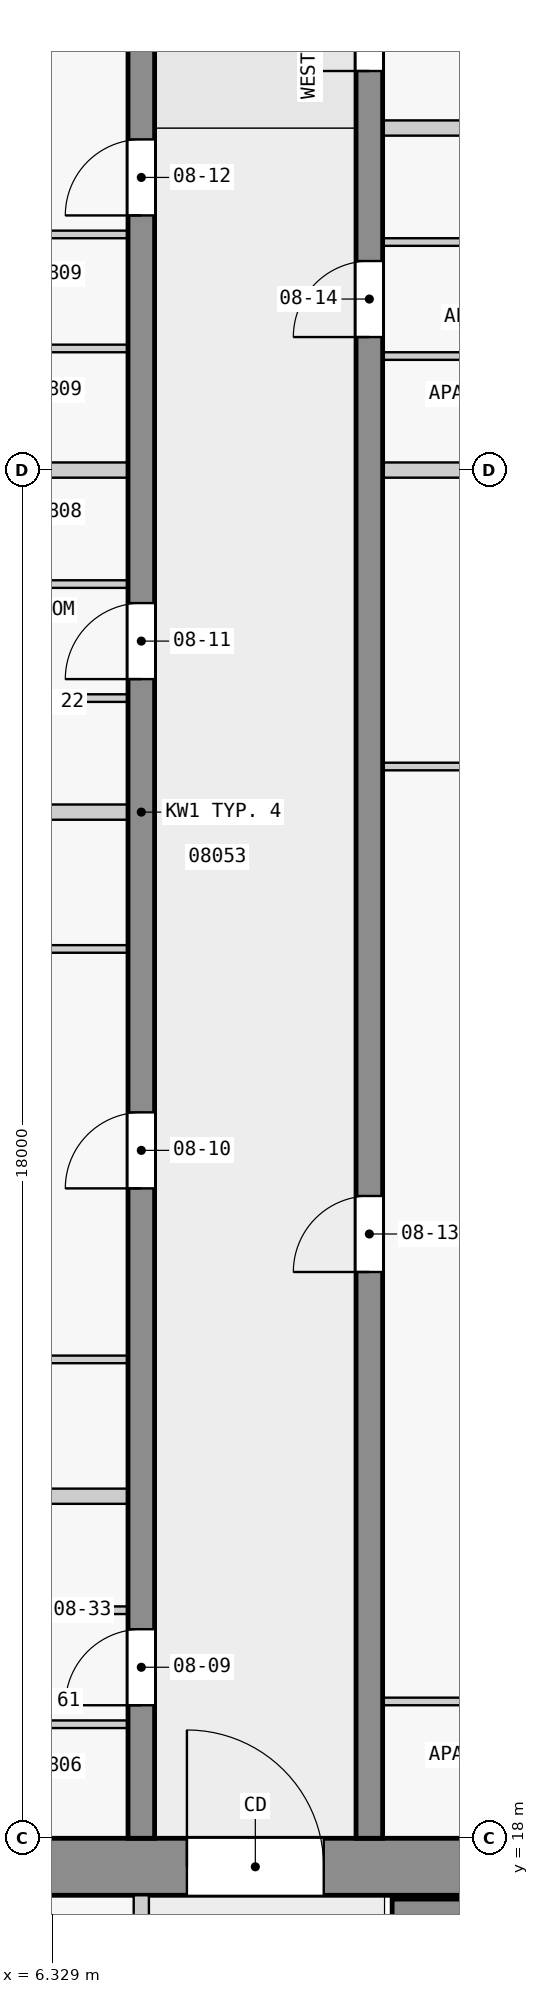
"""IFC4 building model, lengths in metres.
Left out: names, types, materials, properties, quantities, classifications, styles, units other than length and angle.
Written with IfcOpenShell. Run it as: python <this file> out.ifc"""

import sys

from ifc_helpers import new_model, si_unit, direction, frame, frame_2d, origin, place, context, subcontext, project, spatial, rectangle, extrude, element, fill, save


model = new_model("IFC4")
c1 = context("Model", 3, precision=1e-05, world=origin(), true_north=direction((0.0, 1.0)))
c2 = subcontext(c1, "Body", "Model", "MODEL_VIEW")
j1 = project(units=[si_unit("LENGTHUNIT", "METRE"), si_unit("PLANEANGLEUNIT", "RADIAN")], contexts=[c1])
p1 = place(None, origin())
s1 = spatial("IfcSite", under=j1, at=p1, CompositionType="ELEMENT")
p2 = place(p1, origin())
s2 = spatial("IfcBuilding", under=s1, at=p2, CompositionType="ELEMENT")
p3 = place(p2, frame((0.0, 0.0, 37.3)))
s3 = spatial("IfcBuildingStorey", under=s2, at=p3, CompositionType="ELEMENT", Elevation=37.3)
p4 = place(p3, frame((1.55, 17.625, 0.0), z_axis=(0.0, 0.0, 1.0), x_axis=(1.0, 0.0, 0.0)))
e1 = element("IfcWall", 1, at=p4, inside=s3, PredefinedType="SHEAR", context=c2, shape_type="SweptSolid", body=[
    extrude(rectangle(XDim=20.95, YDim=0.75, at=frame_2d((10.475, 0.0))), origin(), (0.0, 0.0, 1.0), 3.25),
])
p5 = place(p4, frame((6.55, 0.0, 0.0)))
e2 = element("IfcOpeningElement", 2, at=p5, cuts=e1, PredefinedType="OPENING", context=c2, shape_type="SweptSolid", body=[
    extrude(rectangle(XDim=1.8, YDim=2.1, at=frame_2d((0.9, 1.05))), frame((0.0, 0.385, 0.0), z_axis=(0.0, -1.0, 0.0), x_axis=(1.0, 0.0, 0.0)), (0.0, 0.0, 1.0), 0.77),
])
p6 = place(p3, frame((10.8, 17.05, 0.0), z_axis=(0.0, 0.0, 1.0), x_axis=(1.0, 0.0, 0.0)))
e3 = element("IfcWall", 3, at=p6, inside=s3, PredefinedType="SHEAR", context=c2, shape_type="SweptSolid", body=[
    extrude(rectangle(XDim=7.8, YDim=0.3, at=frame_2d((3.9, 0.0))), origin(), (0.0, 0.0, 1.0), 3.25),
])
p7 = place(p3, frame((7.5, 18.0, 0.0), z_axis=(0.0, 0.0, 1.0), x_axis=(0.0, 1.0, 0.0)))
e4 = element("IfcWall", 4, at=p7, inside=s3, PredefinedType="SHEAR", context=c2, shape_type="SweptSolid", body=[
    extrude(rectangle(XDim=27.0, YDim=0.35, at=frame_2d((13.5, 0.0))), origin(), (0.0, 0.0, 1.0), 3.25),
])
p8 = place(p7, frame((1.75, 0.0, 0.0)))
e5 = element("IfcOpeningElement", 5, at=p8, cuts=e4, PredefinedType="OPENING", context=c2, shape_type="SweptSolid", body=[
    extrude(rectangle(XDim=1.0, YDim=2.1, at=frame_2d((0.5, 1.05))), frame((0.0, 0.185, 0.0), z_axis=(0.0, -1.0, 0.0), x_axis=(1.0, 0.0, 0.0)), (0.0, 0.0, 1.0), 0.37),
])
p9 = place(p7, frame((8.55, 0.0, 0.0)))
e6 = element("IfcOpeningElement", 6, at=p9, cuts=e4, PredefinedType="OPENING", context=c2, shape_type="SweptSolid", body=[
    extrude(rectangle(XDim=1.0, YDim=2.1, at=frame_2d((0.5, 1.05))), frame((0.0, 0.185, 0.0), z_axis=(0.0, -1.0, 0.0), x_axis=(1.0, 0.0, 0.0)), (0.0, 0.0, 1.0), 0.37),
])
p10 = place(p7, frame((15.25, 0.0, 0.0)))
e7 = element("IfcOpeningElement", 7, at=p10, cuts=e4, PredefinedType="OPENING", context=c2, shape_type="SweptSolid", body=[
    extrude(rectangle(XDim=1.0, YDim=2.1, at=frame_2d((0.5, 1.05))), frame((0.0, 0.185, 0.0), z_axis=(0.0, -1.0, 0.0), x_axis=(1.0, 0.0, 0.0)), (0.0, 0.0, 1.0), 0.37),
])
p11 = place(p7, frame((21.35, 0.0, 0.0)))
e8 = element("IfcOpeningElement", 8, at=p11, cuts=e4, PredefinedType="OPENING", context=c2, shape_type="SweptSolid", body=[
    extrude(rectangle(XDim=1.0, YDim=2.1, at=frame_2d((0.5, 1.05))), frame((0.0, 0.185, 0.0), z_axis=(0.0, -1.0, 0.0), x_axis=(1.0, 0.0, 0.0)), (0.0, 0.0, 1.0), 0.37),
])
p12 = place(p3, frame((10.5, 18.0, 0.0), z_axis=(0.0, 0.0, 1.0), x_axis=(0.0, 1.0, 0.0)))
e9 = element("IfcWall", 9, at=p12, inside=s3, PredefinedType="SHEAR", context=c2, shape_type="SweptSolid", body=[
    extrude(rectangle(XDim=27.0, YDim=0.35, at=frame_2d((13.5, 0.0))), origin(), (0.0, 0.0, 1.0), 3.25),
])
p13 = place(p12, frame((7.45, 0.0, 0.0)))
e10 = element("IfcOpeningElement", 10, at=p13, cuts=e9, PredefinedType="OPENING", context=c2, shape_type="SweptSolid", body=[
    extrude(rectangle(XDim=1.0, YDim=2.1, at=frame_2d((0.5, 1.05))), frame((0.0, 0.185, 0.0), z_axis=(0.0, -1.0, 0.0), x_axis=(1.0, 0.0, 0.0)), (0.0, 0.0, 1.0), 0.37),
])
p14 = place(p12, frame((19.75, 0.0, 0.0)))
e11 = element("IfcOpeningElement", 11, at=p14, cuts=e9, PredefinedType="OPENING", context=c2, shape_type="SweptSolid", body=[
    extrude(rectangle(XDim=1.0, YDim=2.1, at=frame_2d((0.5, 1.05))), frame((0.0, 0.185, 0.0), z_axis=(0.0, -1.0, 0.0), x_axis=(1.0, 0.0, 0.0)), (0.0, 0.0, 1.0), 0.37),
])
p15 = place(p12, frame((23.25, 0.0, 0.0)))
e12 = element("IfcOpeningElement", 12, at=p15, cuts=e9, PredefinedType="OPENING", context=c2, shape_type="SweptSolid", body=[
    extrude(rectangle(XDim=0.9, YDim=2.1, at=frame_2d((0.45, 1.05))), frame((0.0, 0.185, 0.0), z_axis=(0.0, -1.0, 0.0), x_axis=(1.0, 0.0, 0.0)), (0.0, 0.0, 1.0), 0.37),
])
p16 = place(p12, frame((25.45, 0.0, 0.0)))
e13 = element("IfcOpeningElement", 13, at=p16, cuts=e9, PredefinedType="OPENING", context=c2, shape_type="SweptSolid", body=[
    extrude(rectangle(XDim=1.0, YDim=2.1, at=frame_2d((0.5, 1.05))), frame((0.0, 0.185, 0.0), z_axis=(0.0, -1.0, 0.0), x_axis=(1.0, 0.0, 0.0)), (0.0, 0.0, 1.0), 0.37),
])
p17 = place(p3, frame((7.5, 10.1, 0.0), z_axis=(0.0, 0.0, 1.0), x_axis=(0.0, 1.0, 0.0)))
e14 = element("IfcWall", 14, at=p17, inside=s3, PredefinedType="PARTITIONING", context=c2, shape_type="SweptSolid", body=[
    extrude(rectangle(XDim=7.15, YDim=0.2, at=frame_2d((3.575, 0.0))), origin(), (0.0, 0.0, 1.0), 3.25),
])
p18 = place(p17, frame((0.775, 0.0, 0.0)))
e15 = element("IfcOpeningElement", 15, at=p18, cuts=e14, PredefinedType="OPENING", context=c2, shape_type="SweptSolid", body=[
    extrude(rectangle(XDim=0.9, YDim=2.1, at=frame_2d((0.45, 1.05))), frame((0.0, 0.11, 0.0), z_axis=(0.0, -1.0, 0.0), x_axis=(1.0, 0.0, 0.0)), (0.0, 0.0, 1.0), 0.22),
])
p19 = place(p17, frame((3.225, 0.0, 0.0)))
e16 = element("IfcOpeningElement", 16, at=p19, cuts=e14, PredefinedType="OPENING", context=c2, shape_type="SweptSolid", body=[
    extrude(rectangle(XDim=0.9, YDim=2.1, at=frame_2d((0.45, 1.05))), frame((0.0, 0.11, 0.0), z_axis=(0.0, -1.0, 0.0), x_axis=(1.0, 0.0, 0.0)), (0.0, 0.0, 1.0), 0.22),
])
p20 = place(p17, frame((5.25, 0.0, 0.0)))
e17 = element("IfcOpeningElement", 17, at=p20, cuts=e14, PredefinedType="OPENING", context=c2, shape_type="SweptSolid", body=[
    extrude(rectangle(XDim=0.9, YDim=2.1, at=frame_2d((0.45, 1.05))), frame((0.0, 0.11, 0.0), z_axis=(0.0, -1.0, 0.0), x_axis=(1.0, 0.0, 0.0)), (0.0, 0.0, 1.0), 0.22),
])
p21 = place(p3, frame((7.325, 19.5, 0.0), z_axis=(0.0, 0.0, 1.0), x_axis=(-1.0, 0.0, 0.0)))
e18 = element("IfcWall", 18, at=p21, inside=s3, PredefinedType="PARTITIONING", context=c2, shape_type="SweptSolid", body=[
    extrude(rectangle(XDim=3.4, YDim=0.1, at=frame_2d((1.7, 0.0))), origin(), (0.0, 0.0, 1.0), 3.25),
])
p22 = place(p21, frame((1.25, 0.0, 0.0)))
e19 = element("IfcOpeningElement", 19, at=p22, cuts=e18, PredefinedType="OPENING", context=c2, shape_type="SweptSolid", body=[
    extrude(rectangle(XDim=0.9, YDim=2.1, at=frame_2d((0.45, 1.05))), frame((0.0, 0.06, 0.0), z_axis=(0.0, -1.0, 0.0), x_axis=(1.0, 0.0, 0.0)), (0.0, 0.0, 1.0), 0.12),
])
p23 = place(p3, frame((14.025, 19.8, 0.0), z_axis=(0.0, 0.0, 1.0), x_axis=(-1.0, 0.0, 0.0)))
e20 = element("IfcWall", 20, at=p23, inside=s3, PredefinedType="PARTITIONING", context=c2, shape_type="SweptSolid", body=[
    extrude(rectangle(XDim=3.35, YDim=0.1, at=frame_2d((1.675, 0.0))), origin(), (0.0, 0.0, 1.0), 3.25),
])
p24 = place(p23, frame((1.25, 0.0, 0.0)))
e21 = element("IfcOpeningElement", 21, at=p24, cuts=e20, PredefinedType="OPENING", context=c2, shape_type="SweptSolid", body=[
    extrude(rectangle(XDim=0.9, YDim=2.1, at=frame_2d((0.45, 1.05))), frame((0.0, 0.06, 0.0), z_axis=(0.0, -1.0, 0.0), x_axis=(1.0, 0.0, 0.0)), (0.0, 0.0, 1.0), 0.12),
])
p25 = place(p3, frame((3.925, 21.0, 0.0), z_axis=(0.0, 0.0, 1.0), x_axis=(1.0, 0.0, 0.0)))
e22 = element("IfcWall", 22, at=p25, inside=s3, PredefinedType="PARTITIONING", context=c2, shape_type="SweptSolid", body=[
    extrude(rectangle(XDim=3.4, YDim=0.1, at=frame_2d((1.7, 0.0))), origin(), (0.0, 0.0, 1.0), 3.25),
])
p26 = place(p25, frame((1.25, 0.0, 0.0)))
e23 = element("IfcOpeningElement", 23, at=p26, cuts=e22, PredefinedType="OPENING", context=c2, shape_type="SweptSolid", body=[
    extrude(rectangle(XDim=0.9, YDim=2.1, at=frame_2d((0.45, 1.05))), frame((0.0, 0.06, 0.0), z_axis=(0.0, -1.0, 0.0), x_axis=(1.0, 0.0, 0.0)), (0.0, 0.0, 1.0), 0.12),
])
p27 = place(p3, frame((7.325, 22.5, 0.0), z_axis=(0.0, 0.0, 1.0), x_axis=(-1.0, 0.0, 0.0)))
e24 = element("IfcWall", 24, at=p27, inside=s3, PredefinedType="PARTITIONING", context=c2, shape_type="SweptSolid", body=[
    extrude(rectangle(XDim=3.3, YDim=0.2, at=frame_2d((1.65, 0.0))), origin(), (0.0, 0.0, 1.0), 3.25),
])
p28 = place(p3, frame((7.325, 24.3, 0.0), z_axis=(0.0, 0.0, 1.0), x_axis=(-1.0, 0.0, 0.0)))
e25 = element("IfcWall", 25, at=p28, inside=s3, PredefinedType="PARTITIONING", context=c2, shape_type="SweptSolid", body=[
    extrude(rectangle(XDim=3.4, YDim=0.1, at=frame_2d((1.7, 0.0))), origin(), (0.0, 0.0, 1.0), 3.25),
])
p29 = place(p28, frame((1.25, 0.0, 0.0)))
e26 = element("IfcOpeningElement", 26, at=p29, cuts=e25, PredefinedType="OPENING", context=c2, shape_type="SweptSolid", body=[
    extrude(rectangle(XDim=0.9, YDim=2.1, at=frame_2d((0.45, 1.05))), frame((0.0, 0.06, 0.0), z_axis=(0.0, -1.0, 0.0), x_axis=(1.0, 0.0, 0.0)), (0.0, 0.0, 1.0), 0.12),
])
p30 = place(p3, frame((3.925, 29.7, 0.0), z_axis=(0.0, 0.0, 1.0), x_axis=(1.0, 0.0, 0.0)))
e27 = element("IfcWall", 27, at=p30, inside=s3, PredefinedType="PARTITIONING", context=c2, shape_type="SweptSolid", body=[
    extrude(rectangle(XDim=3.4, YDim=0.1, at=frame_2d((1.7, 0.0))), origin(), (0.0, 0.0, 1.0), 3.25),
])
p31 = place(p30, frame((1.25, 0.0, 0.0)))
e28 = element("IfcOpeningElement", 28, at=p31, cuts=e27, PredefinedType="OPENING", context=c2, shape_type="SweptSolid", body=[
    extrude(rectangle(XDim=0.9, YDim=2.1, at=frame_2d((0.45, 1.05))), frame((0.0, 0.06, 0.0), z_axis=(0.0, -1.0, 0.0), x_axis=(1.0, 0.0, 0.0)), (0.0, 0.0, 1.0), 0.12),
])
p32 = place(p3, frame((7.325, 31.5, 0.0), z_axis=(0.0, 0.0, 1.0), x_axis=(-1.0, 0.0, 0.0)))
e29 = element("IfcWall", 29, at=p32, inside=s3, PredefinedType="PARTITIONING", context=c2, shape_type="SweptSolid", body=[
    extrude(rectangle(XDim=3.3, YDim=0.2, at=frame_2d((1.65, 0.0))), origin(), (0.0, 0.0, 1.0), 3.25),
])
p33 = place(p3, frame((10.675, 32.1, 0.0), z_axis=(0.0, 0.0, 1.0), x_axis=(1.0, 0.0, 0.0)))
e30 = element("IfcWall", 30, at=p33, inside=s3, PredefinedType="PARTITIONING", context=c2, shape_type="SweptSolid", body=[
    extrude(rectangle(XDim=3.35, YDim=0.1, at=frame_2d((1.675, 0.0))), origin(), (0.0, 0.0, 1.0), 3.25),
])
p34 = place(p33, frame((1.25, 0.0, 0.0)))
e31 = element("IfcOpeningElement", 31, at=p34, cuts=e30, PredefinedType="OPENING", context=c2, shape_type="SweptSolid", body=[
    extrude(rectangle(XDim=0.9, YDim=2.1, at=frame_2d((0.45, 1.05))), frame((0.0, 0.06, 0.0), z_axis=(0.0, -1.0, 0.0), x_axis=(1.0, 0.0, 0.0)), (0.0, 0.0, 1.0), 0.12),
])
p35 = place(p3, frame((7.325, 33.0, 0.0), z_axis=(0.0, 0.0, 1.0), x_axis=(-1.0, 0.0, 0.0)))
e32 = element("IfcWall", 32, at=p35, inside=s3, PredefinedType="PARTITIONING", context=c2, shape_type="SweptSolid", body=[
    extrude(rectangle(XDim=3.4, YDim=0.1, at=frame_2d((1.7, 0.0))), origin(), (0.0, 0.0, 1.0), 3.25),
])
p36 = place(p35, frame((1.25, 0.0, 0.0)))
e33 = element("IfcOpeningElement", 33, at=p36, cuts=e32, PredefinedType="OPENING", context=c2, shape_type="SweptSolid", body=[
    extrude(rectangle(XDim=0.9, YDim=2.1, at=frame_2d((0.45, 1.05))), frame((0.0, 0.06, 0.0), z_axis=(0.0, -1.0, 0.0), x_axis=(1.0, 0.0, 0.0)), (0.0, 0.0, 1.0), 0.12),
])
p37 = place(p3, frame((3.975, 34.5, 0.0), z_axis=(0.0, 0.0, 1.0), x_axis=(1.0, 0.0, 0.0)))
e34 = element("IfcWall", 34, at=p37, inside=s3, PredefinedType="PARTITIONING", context=c2, shape_type="SweptSolid", body=[
    extrude(rectangle(XDim=3.35, YDim=0.1, at=frame_2d((1.675, 0.0))), origin(), (0.0, 0.0, 1.0), 3.25),
])
p38 = place(p37, frame((1.25, 0.0, 0.0)))
e35 = element("IfcOpeningElement", 35, at=p38, cuts=e34, PredefinedType="OPENING", context=c2, shape_type="SweptSolid", body=[
    extrude(rectangle(XDim=0.9, YDim=2.1, at=frame_2d((0.45, 1.05))), frame((0.0, 0.06, 0.0), z_axis=(0.0, -1.0, 0.0), x_axis=(1.0, 0.0, 0.0)), (0.0, 0.0, 1.0), 0.12),
])
p39 = place(p3, frame((7.325, 36.0, 0.0), z_axis=(0.0, 0.0, 1.0), x_axis=(-1.0, 0.0, 0.0)))
e36 = element("IfcWall", 36, at=p39, inside=s3, PredefinedType="PARTITIONING", context=c2, shape_type="SweptSolid", body=[
    extrude(rectangle(XDim=3.4, YDim=0.2, at=frame_2d((1.7, 0.0))), origin(), (0.0, 0.0, 1.0), 3.25),
])
p40 = place(p3, frame((16.6, 36.0, 0.0), z_axis=(0.0, 0.0, 1.0), x_axis=(-1.0, 0.0, 0.0)))
e37 = element("IfcWall", 37, at=p40, inside=s3, PredefinedType="PARTITIONING", context=c2, shape_type="SweptSolid", body=[
    extrude(rectangle(XDim=5.925, YDim=0.2, at=frame_2d((2.962, 0.0))), origin(), (0.0, 0.0, 1.0), 3.25),
])
p41 = place(p3, frame((14.025, 37.5, 0.0), z_axis=(0.0, 0.0, 1.0), x_axis=(-1.0, 0.0, 0.0)))
e38 = element("IfcWall", 38, at=p41, inside=s3, PredefinedType="PARTITIONING", context=c2, shape_type="SweptSolid", body=[
    extrude(rectangle(XDim=3.35, YDim=0.1, at=frame_2d((1.675, 0.0))), origin(), (0.0, 0.0, 1.0), 3.25),
])
p42 = place(p41, frame((1.25, 0.0, 0.0)))
e39 = element("IfcOpeningElement", 39, at=p42, cuts=e38, PredefinedType="OPENING", context=c2, shape_type="SweptSolid", body=[
    extrude(rectangle(XDim=0.9, YDim=2.1, at=frame_2d((0.45, 1.05))), frame((0.0, 0.06, 0.0), z_axis=(0.0, -1.0, 0.0), x_axis=(1.0, 0.0, 0.0)), (0.0, 0.0, 1.0), 0.12),
])
p43 = place(p3, frame((7.325, 37.6, 0.0), z_axis=(0.0, 0.0, 1.0), x_axis=(-1.0, 0.0, 0.0)))
e40 = element("IfcWall", 40, at=p43, inside=s3, PredefinedType="PARTITIONING", context=c2, shape_type="SweptSolid", body=[
    extrude(rectangle(XDim=3.35, YDim=0.1, at=frame_2d((1.675, 0.0))), origin(), (0.0, 0.0, 1.0), 3.25),
])
p44 = place(p3, frame((10.675, 39.0, 0.0), z_axis=(0.0, 0.0, 1.0), x_axis=(1.0, 0.0, 0.0)))
e41 = element("IfcWall", 41, at=p44, inside=s3, PredefinedType="PARTITIONING", context=c2, shape_type="SweptSolid", body=[
    extrude(rectangle(XDim=3.4, YDim=0.1, at=frame_2d((1.7, 0.0))), origin(), (0.0, 0.0, 1.0), 3.25),
])
p45 = place(p44, frame((1.25, 0.0, 0.0)))
e42 = element("IfcOpeningElement", 42, at=p45, cuts=e41, PredefinedType="OPENING", context=c2, shape_type="SweptSolid", body=[
    extrude(rectangle(XDim=0.9, YDim=2.1, at=frame_2d((0.45, 1.05))), frame((0.0, 0.06, 0.0), z_axis=(0.0, -1.0, 0.0), x_axis=(1.0, 0.0, 0.0)), (0.0, 0.0, 1.0), 0.12),
])
p46 = place(p3, frame((7.325, 39.1, 0.0), z_axis=(0.0, 0.0, 1.0), x_axis=(-1.0, 0.0, 0.0)))
e43 = element("IfcWall", 43, at=p46, inside=s3, PredefinedType="PARTITIONING", context=c2, shape_type="SweptSolid", body=[
    extrude(rectangle(XDim=3.35, YDim=0.1, at=frame_2d((1.675, 0.0))), origin(), (0.0, 0.0, 1.0), 3.25),
])
p47 = place(p46, frame((1.25, 0.0, 0.0)))
e44 = element("IfcOpeningElement", 44, at=p47, cuts=e43, PredefinedType="OPENING", context=c2, shape_type="SweptSolid", body=[
    extrude(rectangle(XDim=0.9, YDim=2.1, at=frame_2d((0.45, 1.05))), frame((0.0, 0.06, 0.0), z_axis=(0.0, -1.0, 0.0), x_axis=(1.0, 0.0, 0.0)), (0.0, 0.0, 1.0), 0.12),
])
p48 = place(p3, frame((13.975, 40.5, 0.0), z_axis=(0.0, 0.0, 1.0), x_axis=(-1.0, 0.0, 0.0)))
e45 = element("IfcWall", 45, at=p48, inside=s3, PredefinedType="PARTITIONING", context=c2, shape_type="SweptSolid", body=[
    extrude(rectangle(XDim=3.3, YDim=0.2, at=frame_2d((1.65, 0.0))), origin(), (0.0, 0.0, 1.0), 3.25),
])
p49 = place(p5, origin())
e46 = element("IfcDoor", 46, at=p49, inside=s3, OperationType="DOUBLE_DOOR_SINGLE_SWING", PredefinedType="DOOR", context=c2, shape_type="SweptSolid", body=[
    extrude(rectangle(XDim=1.8, YDim=2.1, at=frame_2d((0.9, 1.05))), frame((0.0, 0.025, 0.0), z_axis=(0.0, -1.0, 0.0), x_axis=(1.0, 0.0, 0.0)), (0.0, 0.0, 1.0), 0.05),
])
fill(e2, e46)
p50 = place(p8, origin())
e47 = element("IfcDoor", 47, at=p50, inside=s3, OperationType="SINGLE_SWING_LEFT", PredefinedType="DOOR", context=c2, shape_type="SweptSolid", body=[
    extrude(rectangle(XDim=1.0, YDim=2.1, at=frame_2d((0.5, 1.05))), frame((0.0, 0.025, 0.0), z_axis=(0.0, -1.0, 0.0), x_axis=(1.0, 0.0, 0.0)), (0.0, 0.0, 1.0), 0.05),
])
fill(e5, e47)
p51 = place(p9, origin())
e48 = element("IfcDoor", 48, at=p51, inside=s3, OperationType="SINGLE_SWING_LEFT", PredefinedType="DOOR", context=c2, shape_type="SweptSolid", body=[
    extrude(rectangle(XDim=1.0, YDim=2.1, at=frame_2d((0.5, 1.05))), frame((0.0, 0.025, 0.0), z_axis=(0.0, -1.0, 0.0), x_axis=(1.0, 0.0, 0.0)), (0.0, 0.0, 1.0), 0.05),
])
fill(e6, e48)
p52 = place(p10, origin())
e49 = element("IfcDoor", 49, at=p52, inside=s3, OperationType="SINGLE_SWING_RIGHT", PredefinedType="DOOR", context=c2, shape_type="SweptSolid", body=[
    extrude(rectangle(XDim=1.0, YDim=2.1, at=frame_2d((0.5, 1.05))), frame((0.0, 0.025, 0.0), z_axis=(0.0, -1.0, 0.0), x_axis=(1.0, 0.0, 0.0)), (0.0, 0.0, 1.0), 0.05),
])
fill(e7, e49)
p53 = place(p11, origin())
e50 = element("IfcDoor", 50, at=p53, inside=s3, OperationType="SINGLE_SWING_RIGHT", PredefinedType="DOOR", context=c2, shape_type="SweptSolid", body=[
    extrude(rectangle(XDim=1.0, YDim=2.1, at=frame_2d((0.5, 1.05))), frame((0.0, 0.025, 0.0), z_axis=(0.0, -1.0, 0.0), x_axis=(1.0, 0.0, 0.0)), (0.0, 0.0, 1.0), 0.05),
])
fill(e8, e50)
p54 = place(p13, origin())
e51 = element("IfcDoor", 51, at=p54, inside=s3, OperationType="SINGLE_SWING_LEFT", PredefinedType="DOOR", context=c2, shape_type="SweptSolid", body=[
    extrude(rectangle(XDim=1.0, YDim=2.1, at=frame_2d((0.5, 1.05))), frame((0.0, 0.025, 0.0), z_axis=(0.0, -1.0, 0.0), x_axis=(1.0, 0.0, 0.0)), (0.0, 0.0, 1.0), 0.05),
])
fill(e10, e51)
p55 = place(p14, origin())
e52 = element("IfcDoor", 52, at=p55, inside=s3, OperationType="SINGLE_SWING_RIGHT", PredefinedType="DOOR", context=c2, shape_type="SweptSolid", body=[
    extrude(rectangle(XDim=1.0, YDim=2.1, at=frame_2d((0.5, 1.05))), frame((0.0, 0.025, 0.0), z_axis=(0.0, -1.0, 0.0), x_axis=(1.0, 0.0, 0.0)), (0.0, 0.0, 1.0), 0.05),
])
fill(e11, e52)
p56 = place(p15, origin())
e53 = element("IfcDoor", 53, at=p56, inside=s3, OperationType="SINGLE_SWING_RIGHT", PredefinedType="DOOR", context=c2, shape_type="SweptSolid", body=[
    extrude(rectangle(XDim=0.9, YDim=2.1, at=frame_2d((0.45, 1.05))), frame((0.0, 0.025, 0.0), z_axis=(0.0, -1.0, 0.0), x_axis=(1.0, 0.0, 0.0)), (0.0, 0.0, 1.0), 0.05),
])
fill(e12, e53)
save(model, sys.argv[1])
